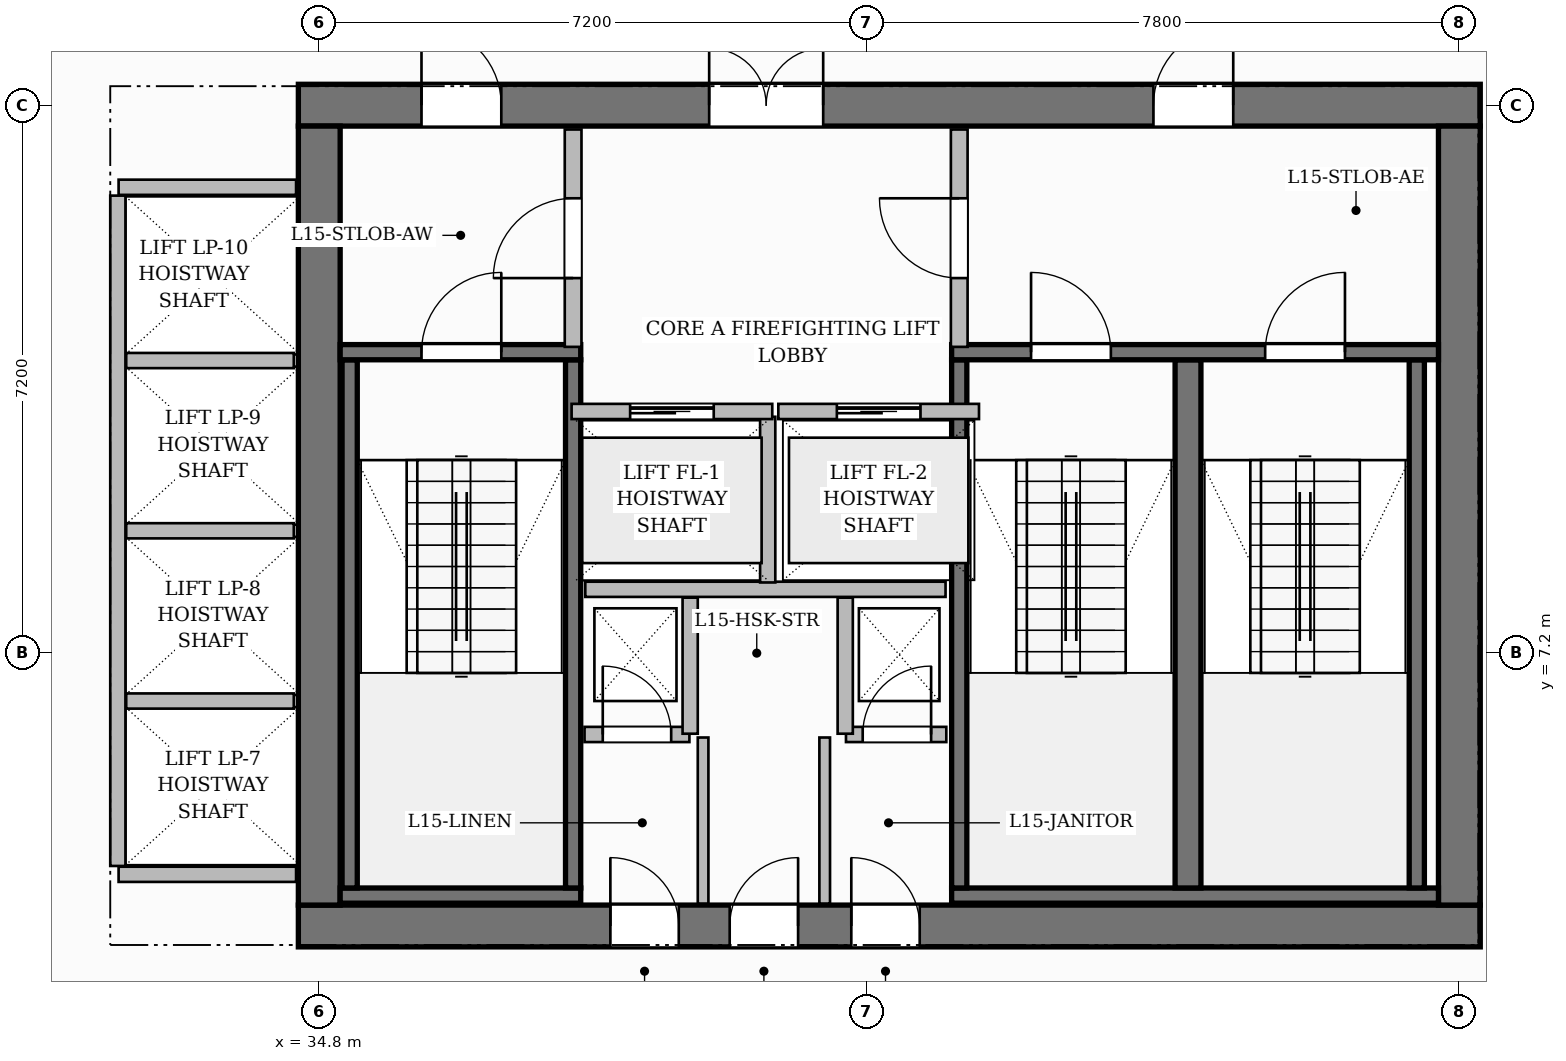
"""IFC4 building model, lengths in metres.
Left out: names, types, materials, properties, quantities, classifications, styles, units other than length and angle.
Written with IfcOpenShell. Run it as: python <this file> out.ifc"""

import sys

from ifc_helpers import new_model, si_unit, direction, frame, frame_2d, origin, place, context, subcontext, project, spatial, rectangle, extrude, source, transform, mapped, element, fill, save


model = new_model("IFC4")
c1 = context("Model", 3, precision=1e-05, world=origin(), true_north=direction((0.0, 1.0)))
c2 = subcontext(c1, "Body", "Model", "MODEL_VIEW")
j1 = project(units=[si_unit("LENGTHUNIT", "METRE"), si_unit("PLANEANGLEUNIT", "RADIAN")], contexts=[c1])
p1 = place(None, origin())
s1 = spatial("IfcSite", under=j1, at=p1, CompositionType="ELEMENT")
p2 = place(p1, origin())
s2 = spatial("IfcBuilding", under=s1, at=p2, CompositionType="ELEMENT")
p3 = place(p2, frame((0.0, 0.0, 65.7)))
s3 = spatial("IfcBuildingStorey", under=s2, at=p3, CompositionType="ELEMENT", Elevation=65.7)
p4 = place(p3, frame((34.525, 3.6, 0.0), z_axis=(0.0, 0.0, 1.0), x_axis=(1.0, 0.0, 0.0)))
e1 = element("IfcWall", 1, at=p4, inside=s3, PredefinedType="SHEAR", context=c2, shape_type="SweptSolid", body=[
    extrude(rectangle(XDim=15.55, YDim=0.55, at=frame_2d((7.775, 0.0))), origin(), (0.0, 0.0, 1.0), 3.7),
])
p5 = place(p4, frame((4.105, 0.0, 0.0)))
e2 = element("IfcOpeningElement", 2, at=p5, cuts=e1, PredefinedType="OPENING", context=c2, shape_type="SweptSolid", body=[
    extrude(rectangle(XDim=0.9, YDim=2.1, at=frame_2d((0.45, 1.05))), frame((0.0, 0.285, 0.0), z_axis=(0.0, -1.0, 0.0), x_axis=(1.0, 0.0, 0.0)), (0.0, 0.0, 1.0), 0.57),
])
p6 = place(p4, frame((5.675, 0.0, 0.0)))
e3 = element("IfcOpeningElement", 3, at=p6, cuts=e1, PredefinedType="OPENING", context=c2, shape_type="SweptSolid", body=[
    extrude(rectangle(XDim=0.9, YDim=2.1, at=frame_2d((0.45, 1.05))), frame((0.0, 0.285, 0.0), z_axis=(0.0, -1.0, 0.0), x_axis=(1.0, 0.0, 0.0)), (0.0, 0.0, 1.0), 0.57),
])
p7 = place(p4, frame((7.275, 0.0, 0.0)))
e4 = element("IfcOpeningElement", 4, at=p7, cuts=e1, PredefinedType="OPENING", context=c2, shape_type="SweptSolid", body=[
    extrude(rectangle(XDim=0.9, YDim=2.1, at=frame_2d((0.45, 1.05))), frame((0.0, 0.285, 0.0), z_axis=(0.0, -1.0, 0.0), x_axis=(1.0, 0.0, 0.0)), (0.0, 0.0, 1.0), 0.57),
])
p8 = place(p3, frame((34.525, 14.4, 0.0), z_axis=(0.0, 0.0, 1.0), x_axis=(1.0, 0.0, 0.0)))
e5 = element("IfcWall", 5, at=p8, inside=s3, PredefinedType="SHEAR", context=c2, shape_type="SweptSolid", body=[
    extrude(rectangle(XDim=15.55, YDim=0.55, at=frame_2d((7.775, 0.0))), origin(), (0.0, 0.0, 1.0), 3.7),
])
p9 = place(p8, frame((5.405, 0.0, 0.0)))
e6 = element("IfcOpeningElement", 6, at=p9, cuts=e5, PredefinedType="OPENING", context=c2, shape_type="SweptSolid", body=[
    extrude(rectangle(XDim=1.5, YDim=2.2, at=frame_2d((0.75, 1.1))), frame((0.0, 0.285, 0.0), z_axis=(0.0, -1.0, 0.0), x_axis=(1.0, 0.0, 0.0)), (0.0, 0.0, 1.0), 0.57),
])
p10 = place(p8, frame((1.62, 0.0, 0.0)))
e7 = element("IfcOpeningElement", 7, at=p10, cuts=e5, PredefinedType="OPENING", context=c2, shape_type="SweptSolid", body=[
    extrude(rectangle(XDim=1.05, YDim=2.15, at=frame_2d((0.525, 1.075))), frame((0.0, 0.285, 0.0), z_axis=(0.0, -1.0, 0.0), x_axis=(1.0, 0.0, 0.0)), (0.0, 0.0, 1.0), 0.57),
])
p11 = place(p8, frame((11.25, 0.0, 0.0)))
e8 = element("IfcOpeningElement", 8, at=p11, cuts=e5, PredefinedType="OPENING", context=c2, shape_type="SweptSolid", body=[
    extrude(rectangle(XDim=1.05, YDim=2.15, at=frame_2d((0.525, 1.075))), frame((0.0, 0.285, 0.0), z_axis=(0.0, -1.0, 0.0), x_axis=(1.0, 0.0, 0.0)), (0.0, 0.0, 1.0), 0.57),
])
for number, where, z_axis, x_axis in (
    (9, (34.8, 3.875, 0.0), (0.0, 0.0, 1.0), (0.0, 1.0, 0.0)),
    (10, (49.8, 3.875, 0.0), (0.0, 0.0, 1.0), (0.0, 1.0, 0.0)),
):
    element("IfcWall", number, at=place(p3, frame(where, z_axis=z_axis, x_axis=x_axis)), inside=s3, PredefinedType="SHEAR", context=c2, shape_type="SweptSolid", body=[
        extrude(rectangle(XDim=10.25, YDim=0.55, at=frame_2d((5.125, 0.0))), origin(), (0.0, 0.0, 1.0), 3.7),
    ])
p12 = place(p3, frame((35.075, 4.0, 0.0), z_axis=(0.0, 0.0, 1.0), x_axis=(1.0, 0.0, 0.0)))
e11 = element("IfcWall", 11, at=p12, inside=s3, PredefinedType="SHEAR", context=c2, shape_type="SweptSolid", body=[
    extrude(rectangle(XDim=3.165, YDim=0.2, at=frame_2d((1.583, 0.0))), origin(), (0.0, 0.0, 1.0), 3.7),
])
for number, where, z_axis, x_axis in (
    (12, (35.2, 4.1, 0.0), (0.0, 0.0, 1.0), (0.0, 1.0, 0.0)),
    (13, (38.14, 4.1, 0.0), (0.0, 0.0, 1.0), (0.0, 1.0, 0.0)),
):
    element("IfcWall", number, at=place(p3, frame(where, z_axis=z_axis, x_axis=x_axis)), inside=s3, PredefinedType="SHEAR", context=c2, shape_type="SweptSolid", body=[
        extrude(rectangle(XDim=6.95, YDim=0.2, at=frame_2d((3.475, 0.0))), origin(), (0.0, 0.0, 1.0), 3.7),
    ])
p13 = place(p3, frame((35.075, 11.15, 0.0), z_axis=(0.0, 0.0, 1.0), x_axis=(1.0, 0.0, 0.0)))
e14 = element("IfcWall", 14, at=p13, inside=s3, PredefinedType="SHEAR", context=c2, shape_type="SweptSolid", body=[
    extrude(rectangle(XDim=3.165, YDim=0.2, at=frame_2d((1.583, 0.0))), origin(), (0.0, 0.0, 1.0), 3.7),
])
p14 = place(p13, frame((1.07, 0.0, 0.0)))
e15 = element("IfcOpeningElement", 15, at=p14, cuts=e14, PredefinedType="OPENING", context=c2, shape_type="SweptSolid", body=[
    extrude(rectangle(XDim=1.05, YDim=2.2, at=frame_2d((0.525, 1.1))), frame((0.0, 0.11, 0.0), z_axis=(0.0, -1.0, 0.0), x_axis=(1.0, 0.0, 0.0)), (0.0, 0.0, 1.0), 0.22),
])
p15 = place(p3, frame((43.12, 4.0, 0.0), z_axis=(0.0, 0.0, 1.0), x_axis=(1.0, 0.0, 0.0)))
e16 = element("IfcWall", 16, at=p15, inside=s3, PredefinedType="SHEAR", context=c2, shape_type="SweptSolid", body=[
    extrude(rectangle(XDim=6.405, YDim=0.2, at=frame_2d((3.202, 0.0))), origin(), (0.0, 0.0, 1.0), 3.7),
])
p16 = place(p3, frame((43.22, 4.1, 0.0), z_axis=(0.0, 0.0, 1.0), x_axis=(0.0, 1.0, 0.0)))
e17 = element("IfcWall", 17, at=p16, inside=s3, PredefinedType="SHEAR", context=c2, shape_type="SweptSolid", body=[
    extrude(rectangle(XDim=6.95, YDim=0.2, at=frame_2d((3.475, 0.0))), origin(), (0.0, 0.0, 1.0), 3.7),
])
p17 = place(p3, frame((46.23, 4.1, 0.0), z_axis=(0.0, 0.0, 1.0), x_axis=(0.0, 1.0, 0.0)))
e18 = element("IfcWall", 18, at=p17, inside=s3, PredefinedType="SHEAR", context=c2, shape_type="SweptSolid", body=[
    extrude(rectangle(XDim=6.95, YDim=0.34, at=frame_2d((3.475, 0.0))), origin(), (0.0, 0.0, 1.0), 3.7),
])
p18 = place(p3, frame((49.24, 4.1, 0.0), z_axis=(0.0, 0.0, 1.0), x_axis=(0.0, 1.0, 0.0)))
e19 = element("IfcWall", 19, at=p18, inside=s3, PredefinedType="SHEAR", context=c2, shape_type="SweptSolid", body=[
    extrude(rectangle(XDim=6.95, YDim=0.2, at=frame_2d((3.475, 0.0))), origin(), (0.0, 0.0, 1.0), 3.7),
])
p19 = place(p3, frame((43.12, 11.15, 0.0), z_axis=(0.0, 0.0, 1.0), x_axis=(1.0, 0.0, 0.0)))
e20 = element("IfcWall", 20, at=p19, inside=s3, PredefinedType="SHEAR", context=c2, shape_type="SweptSolid", body=[
    extrude(rectangle(XDim=6.405, YDim=0.2, at=frame_2d((3.202, 0.0))), origin(), (0.0, 0.0, 1.0), 3.7),
])
p20 = place(p19, frame((1.045, 0.0, 0.0)))
e21 = element("IfcOpeningElement", 21, at=p20, cuts=e20, PredefinedType="OPENING", context=c2, shape_type="SweptSolid", body=[
    extrude(rectangle(XDim=1.05, YDim=2.2, at=frame_2d((0.525, 1.1))), frame((0.0, 0.11, 0.0), z_axis=(0.0, -1.0, 0.0), x_axis=(1.0, 0.0, 0.0)), (0.0, 0.0, 1.0), 0.22),
])
p21 = place(p19, frame((4.125, 0.0, 0.0)))
e22 = element("IfcOpeningElement", 22, at=p21, cuts=e20, PredefinedType="OPENING", context=c2, shape_type="SweptSolid", body=[
    extrude(rectangle(XDim=1.05, YDim=2.2, at=frame_2d((0.525, 1.1))), frame((0.0, 0.11, 0.0), z_axis=(0.0, -1.0, 0.0), x_axis=(1.0, 0.0, 0.0)), (0.0, 0.0, 1.0), 0.22),
])
p22 = place(p3, frame((38.3, 8.03, 0.0), z_axis=(0.0, 0.0, 1.0), x_axis=(1.0, 0.0, 0.0)))
e23 = element("IfcWall", 23, at=p22, inside=s3, PredefinedType="PARTITIONING", context=c2, shape_type="SweptSolid", body=[
    extrude(rectangle(XDim=4.74, YDim=0.2, at=frame_2d((2.37, 0.0))), origin(), (0.0, 0.0, 1.0), 3.45),
])
p23 = place(p3, frame((40.7, 8.12, 0.0), z_axis=(0.0, 0.0, 1.0), x_axis=(0.0, 1.0, 0.0)))
e24 = element("IfcWall", 24, at=p23, inside=s3, PredefinedType="PARTITIONING", context=c2, shape_type="SweptSolid", body=[
    extrude(rectangle(XDim=2.18, YDim=0.2, at=frame_2d((1.09, 0.0))), origin(), (0.0, 0.0, 1.0), 3.45),
])
p24 = place(p3, frame((38.14, 11.22, 0.0), z_axis=(0.0, 0.0, 1.0), x_axis=(0.0, 1.0, 0.0)))
e25 = element("IfcWall", 25, at=p24, inside=s3, PredefinedType="PARTITIONING", context=c2, shape_type="SweptSolid", body=[
    extrude(rectangle(XDim=2.86, YDim=0.22, at=frame_2d((1.43, 0.0))), origin(), (0.0, 0.0, 1.0), 3.45),
])
p25 = place(p24, frame((0.905, 0.0, 0.0)))
e26 = element("IfcOpeningElement", 26, at=p25, cuts=e25, PredefinedType="OPENING", context=c2, shape_type="SweptSolid", body=[
    extrude(rectangle(XDim=1.05, YDim=2.15, at=frame_2d((0.525, 1.075))), frame((0.0, 0.12, 0.0), z_axis=(0.0, -1.0, 0.0), x_axis=(1.0, 0.0, 0.0)), (0.0, 0.0, 1.0), 0.24),
])
p26 = place(p3, frame((43.22, 11.22, 0.0), z_axis=(0.0, 0.0, 1.0), x_axis=(0.0, 1.0, 0.0)))
e27 = element("IfcWall", 27, at=p26, inside=s3, PredefinedType="PARTITIONING", context=c2, shape_type="SweptSolid", body=[
    extrude(rectangle(XDim=2.86, YDim=0.22, at=frame_2d((1.43, 0.0))), origin(), (0.0, 0.0, 1.0), 3.45),
])
p27 = place(p26, frame((0.905, 0.0, 0.0)))
e28 = element("IfcOpeningElement", 28, at=p27, cuts=e27, PredefinedType="OPENING", context=c2, shape_type="SweptSolid", body=[
    extrude(rectangle(XDim=1.05, YDim=2.15, at=frame_2d((0.525, 1.075))), frame((0.0, 0.12, 0.0), z_axis=(0.0, -1.0, 0.0), x_axis=(1.0, 0.0, 0.0)), (0.0, 0.0, 1.0), 0.24),
])
p28 = place(p3, frame((38.29, 6.12, 0.0), z_axis=(0.0, 0.0, 1.0), x_axis=(1.0, 0.0, 0.0)))
e29 = element("IfcWall", 29, at=p28, inside=s3, PredefinedType="PARTITIONING", context=c2, shape_type="SweptSolid", body=[
    extrude(rectangle(XDim=1.38, YDim=0.2, at=frame_2d((0.69, 0.0))), origin(), (0.0, 0.0, 1.0), 3.45),
])
p29 = place(p28, frame((0.24, 0.0, 0.0)))
e30 = element("IfcOpeningElement", 30, at=p29, cuts=e29, PredefinedType="OPENING", context=c2, shape_type="SweptSolid", body=[
    extrude(rectangle(XDim=0.9, YDim=2.1, at=frame_2d((0.45, 1.05))), frame((0.0, 0.11, 0.0), z_axis=(0.0, -1.0, 0.0), x_axis=(1.0, 0.0, 0.0)), (0.0, 0.0, 1.0), 0.22),
])
p30 = place(p3, frame((39.68, 6.13, 0.0), z_axis=(0.0, 0.0, 1.0), x_axis=(0.0, 1.0, 0.0)))
e31 = element("IfcWall", 31, at=p30, inside=s3, PredefinedType="PARTITIONING", context=c2, shape_type="SweptSolid", body=[
    extrude(rectangle(XDim=1.79, YDim=0.2, at=frame_2d((0.895, 0.0))), origin(), (0.0, 0.0, 1.0), 3.45),
])
p31 = place(p3, frame((41.73, 6.12, 0.0), z_axis=(0.0, 0.0, 1.0), x_axis=(1.0, 0.0, 0.0)))
e32 = element("IfcWall", 32, at=p31, inside=s3, PredefinedType="PARTITIONING", context=c2, shape_type="SweptSolid", body=[
    extrude(rectangle(XDim=1.32, YDim=0.2, at=frame_2d((0.66, 0.0))), origin(), (0.0, 0.0, 1.0), 3.45),
])
p32 = place(p31, frame((0.22, 0.0, 0.0)))
e33 = element("IfcOpeningElement", 33, at=p32, cuts=e32, PredefinedType="OPENING", context=c2, shape_type="SweptSolid", body=[
    extrude(rectangle(XDim=0.9, YDim=2.1, at=frame_2d((0.45, 1.05))), frame((0.0, 0.11, 0.0), z_axis=(0.0, -1.0, 0.0), x_axis=(1.0, 0.0, 0.0)), (0.0, 0.0, 1.0), 0.22),
])
p33 = place(p3, frame((41.72, 6.13, 0.0), z_axis=(0.0, 0.0, 1.0), x_axis=(0.0, 1.0, 0.0)))
e34 = element("IfcWall", 34, at=p33, inside=s3, PredefinedType="PARTITIONING", context=c2, shape_type="SweptSolid", body=[
    extrude(rectangle(XDim=1.79, YDim=0.2, at=frame_2d((0.895, 0.0))), origin(), (0.0, 0.0, 1.0), 3.45),
])
for number, where, z_axis, x_axis in (
    (35, (39.85, 3.895, 0.0), (0.0, 0.0, 1.0), (0.0, 1.0, 0.0)),
    (36, (41.45, 3.895, 0.0), (0.0, 0.0, 1.0), (0.0, 1.0, 0.0)),
):
    element("IfcWall", number, at=place(p3, frame(where, z_axis=z_axis, x_axis=x_axis)), inside=s3, PredefinedType="PARTITIONING", context=c2, shape_type="SweptSolid", body=[
        extrude(rectangle(XDim=2.185, YDim=0.14, at=frame_2d((1.093, 0.0))), origin(), (0.0, 0.0, 1.0), 3.45),
    ])
for number, where, z_axis, x_axis in (
    (37, (32.16, 4.28, 0.0), (0.0, 0.0, 1.0), (1.0, 0.0, 0.0)),
    (38, (32.16, 13.32, 0.0), (0.0, 0.0, 1.0), (1.0, 0.0, 0.0)),
):
    element("IfcWall", number, at=place(p3, frame(where, z_axis=z_axis, x_axis=x_axis)), inside=s3, PredefinedType="PARTITIONING", context=c2, shape_type="SweptSolid", body=[
        extrude(rectangle(XDim=2.335, YDim=0.2, at=frame_2d((1.167, 0.0))), origin(), (0.0, 0.0, 1.0), 3.45),
    ])
p34 = place(p3, frame((32.15, 4.39, 0.0), z_axis=(0.0, 0.0, 1.0), x_axis=(0.0, 1.0, 0.0)))
e39 = element("IfcWall", 39, at=p34, inside=s3, PredefinedType="PARTITIONING", context=c2, shape_type="SweptSolid", body=[
    extrude(rectangle(XDim=8.82, YDim=0.2, at=frame_2d((4.41, 0.0))), origin(), (0.0, 0.0, 1.0), 3.45),
])
for number, where, z_axis, x_axis in (
    (40, (32.26, 6.56, 0.0), (0.0, 0.0, 1.0), (1.0, 0.0, 0.0)),
    (41, (32.26, 8.8, 0.0), (0.0, 0.0, 1.0), (1.0, 0.0, 0.0)),
    (42, (32.26, 11.04, 0.0), (0.0, 0.0, 1.0), (1.0, 0.0, 0.0)),
):
    element("IfcWall", number, at=place(p3, frame(where, z_axis=z_axis, x_axis=x_axis)), inside=s3, PredefinedType="PARTITIONING", context=c2, shape_type="SweptSolid", body=[
        extrude(rectangle(XDim=2.205, YDim=0.2, at=frame_2d((1.103, 0.0))), origin(), (0.0, 0.0, 1.0), 3.45),
    ])
p35 = place(p3, frame((38.12, 10.37, 0.0), z_axis=(0.0, 0.0, 1.0), x_axis=(1.0, 0.0, 0.0)))
e43 = element("IfcWall", 43, at=p35, inside=s3, PredefinedType="PARTITIONING", context=c2, shape_type="SweptSolid", body=[
    extrude(rectangle(XDim=2.64, YDim=0.2, at=frame_2d((1.32, 0.0))), origin(), (0.0, 0.0, 1.0), 3.45),
])
p36 = place(p35, frame((0.77, 0.0, 0.0)))
e44 = element("IfcOpeningElement", 44, at=p36, cuts=e43, PredefinedType="OPENING", context=c2, shape_type="SweptSolid", body=[
    extrude(rectangle(XDim=1.1, YDim=2.2, at=frame_2d((0.55, 1.1))), frame((0.0, 0.11, 0.0), z_axis=(0.0, -1.0, 0.0), x_axis=(1.0, 0.0, 0.0)), (0.0, 0.0, 1.0), 0.22),
])
p37 = place(p3, frame((40.84, 10.37, 0.0), z_axis=(0.0, 0.0, 1.0), x_axis=(1.0, 0.0, 0.0)))
e45 = element("IfcWall", 45, at=p37, inside=s3, PredefinedType="PARTITIONING", context=c2, shape_type="SweptSolid", body=[
    extrude(rectangle(XDim=2.64, YDim=0.2, at=frame_2d((1.32, 0.0))), origin(), (0.0, 0.0, 1.0), 3.45),
])
p38 = place(p37, frame((0.77, 0.0, 0.0)))
e46 = element("IfcOpeningElement", 46, at=p38, cuts=e45, PredefinedType="OPENING", context=c2, shape_type="SweptSolid", body=[
    extrude(rectangle(XDim=1.1, YDim=2.2, at=frame_2d((0.55, 1.1))), frame((0.0, 0.11, 0.0), z_axis=(0.0, -1.0, 0.0), x_axis=(1.0, 0.0, 0.0)), (0.0, 0.0, 1.0), 0.22),
])
m1 = source(origin(), c2, "Body", "SweptSolid", [
    extrude(rectangle(XDim=1.05, YDim=2.2, at=frame_2d((0.525, 1.1))), frame((0.0, 0.025, 0.0), z_axis=(0.0, -1.0, 0.0), x_axis=(1.0, 0.0, 0.0)), (0.0, 0.0, 1.0), 0.05),
])
p39 = place(p14, origin())
e47 = element("IfcDoor", 47, at=p39, inside=s3, OperationType="SINGLE_SWING_RIGHT", PredefinedType="DOOR", context=c2, shape_type="MappedRepresentation", body=[
    mapped(m1, transform((0.0, 0.0, 0.0), scale=1.0)),
])
fill(e15, e47)
p40 = place(p20, origin())
e48 = element("IfcDoor", 48, at=p40, inside=s3, OperationType="SINGLE_SWING_LEFT", PredefinedType="DOOR", context=c2, shape_type="MappedRepresentation", body=[
    mapped(m1, transform((0.0, 0.0, 0.0), scale=1.0)),
])
fill(e21, e48)
p41 = place(p21, origin())
e49 = element("IfcDoor", 49, at=p41, inside=s3, OperationType="SINGLE_SWING_RIGHT", PredefinedType="DOOR", context=c2, shape_type="MappedRepresentation", body=[
    mapped(m1, transform((0.0, 0.0, 0.0), scale=1.0)),
])
fill(e22, e49)
m2 = source(origin(), c2, "Body", "SweptSolid", [
    extrude(rectangle(XDim=1.05, YDim=2.15, at=frame_2d((0.525, 1.075))), frame((0.0, 0.025, 0.0), z_axis=(0.0, -1.0, 0.0), x_axis=(1.0, 0.0, 0.0)), (0.0, 0.0, 1.0), 0.05),
])
p42 = place(p25, origin())
e50 = element("IfcDoor", 50, at=p42, inside=s3, OperationType="SINGLE_SWING_LEFT", PredefinedType="DOOR", context=c2, shape_type="MappedRepresentation", body=[
    mapped(m2, transform((0.0, 0.0, 0.0), scale=1.0)),
])
fill(e26, e50)
p43 = place(p27, origin())
e51 = element("IfcDoor", 51, at=p43, inside=s3, OperationType="SINGLE_SWING_RIGHT", PredefinedType="DOOR", context=c2, shape_type="MappedRepresentation", body=[
    mapped(m2, transform((0.0, 0.0, 0.0), scale=1.0)),
])
fill(e28, e51)
m3 = source(origin(), c2, "Body", "SweptSolid", [
    extrude(rectangle(XDim=1.5, YDim=2.2, at=frame_2d((0.75, 1.1))), frame((0.0, 0.025, 0.0), z_axis=(0.0, -1.0, 0.0), x_axis=(1.0, 0.0, 0.0)), (0.0, 0.0, 1.0), 0.05),
])
p44 = place(p9, origin())
e52 = element("IfcDoor", 52, at=p44, inside=s3, OperationType="DOUBLE_DOOR_SINGLE_SWING", PredefinedType="DOOR", context=c2, shape_type="MappedRepresentation", body=[
    mapped(m3, transform((0.0, 0.0, 0.0), scale=1.0)),
])
fill(e6, e52)
p45 = place(p10, origin())
e53 = element("IfcDoor", 53, at=p45, inside=s3, OperationType="SINGLE_SWING_LEFT", PredefinedType="DOOR", context=c2, shape_type="MappedRepresentation", body=[
    mapped(m2, transform((0.0, 0.0, 0.0), scale=1.0)),
])
fill(e7, e53)
p46 = place(p11, origin())
e54 = element("IfcDoor", 54, at=p46, inside=s3, OperationType="SINGLE_SWING_RIGHT", PredefinedType="DOOR", context=c2, shape_type="MappedRepresentation", body=[
    mapped(m2, transform((0.0, 0.0, 0.0), scale=1.0)),
])
fill(e8, e54)
m4 = source(origin(), c2, "Body", "SweptSolid", [
    extrude(rectangle(XDim=0.9, YDim=2.1, at=frame_2d((0.45, 1.05))), frame((0.0, 0.025, 0.0), z_axis=(0.0, -1.0, 0.0), x_axis=(1.0, 0.0, 0.0)), (0.0, 0.0, 1.0), 0.05),
])
p47 = place(p29, origin())
e55 = element("IfcDoor", 55, at=p47, inside=s3, OperationType="SINGLE_SWING_LEFT", PredefinedType="DOOR", context=c2, shape_type="MappedRepresentation", body=[
    mapped(m4, transform((0.0, 0.0, 0.0), scale=1.0)),
])
fill(e30, e55)
p48 = place(p32, origin())
e56 = element("IfcDoor", 56, at=p48, inside=s3, OperationType="SINGLE_SWING_RIGHT", PredefinedType="DOOR", context=c2, shape_type="MappedRepresentation", body=[
    mapped(m4, transform((0.0, 0.0, 0.0), scale=1.0)),
])
fill(e33, e56)
p49 = place(p5, origin())
e57 = element("IfcDoor", 57, at=p49, inside=s3, OperationType="SINGLE_SWING_LEFT", PredefinedType="DOOR", context=c2, shape_type="MappedRepresentation", body=[
    mapped(m4, transform((0.0, 0.0, 0.0), scale=1.0)),
])
fill(e2, e57)
p50 = place(p6, origin())
e58 = element("IfcDoor", 58, at=p50, inside=s3, OperationType="SINGLE_SWING_RIGHT", PredefinedType="DOOR", context=c2, shape_type="MappedRepresentation", body=[
    mapped(m4, transform((0.0, 0.0, 0.0), scale=1.0)),
])
fill(e3, e58)
p51 = place(p7, origin())
e59 = element("IfcDoor", 59, at=p51, inside=s3, OperationType="SINGLE_SWING_LEFT", PredefinedType="DOOR", context=c2, shape_type="MappedRepresentation", body=[
    mapped(m4, transform((0.0, 0.0, 0.0), scale=1.0)),
])
fill(e4, e59)
m5 = source(origin(), c2, "Body", "SweptSolid", [
    extrude(rectangle(XDim=1.1, YDim=2.2, at=frame_2d((0.55, 1.1))), frame((0.0, 0.025, 0.0), z_axis=(0.0, -1.0, 0.0), x_axis=(1.0, 0.0, 0.0)), (0.0, 0.0, 1.0), 0.05),
])
p52 = place(p36, origin())
e60 = element("IfcDoor", 60, at=p52, inside=s3, OperationType="SLIDING_TO_LEFT", PredefinedType="DOOR", context=c2, shape_type="MappedRepresentation", body=[
    mapped(m5, transform((0.0, 0.0, 0.0), scale=1.0)),
])
fill(e44, e60)
p53 = place(p38, origin())
e61 = element("IfcDoor", 61, at=p53, inside=s3, OperationType="SLIDING_TO_LEFT", PredefinedType="DOOR", context=c2, shape_type="MappedRepresentation", body=[
    mapped(m5, transform((0.0, 0.0, 0.0), scale=1.0)),
])
fill(e46, e61)
save(model, sys.argv[1])
